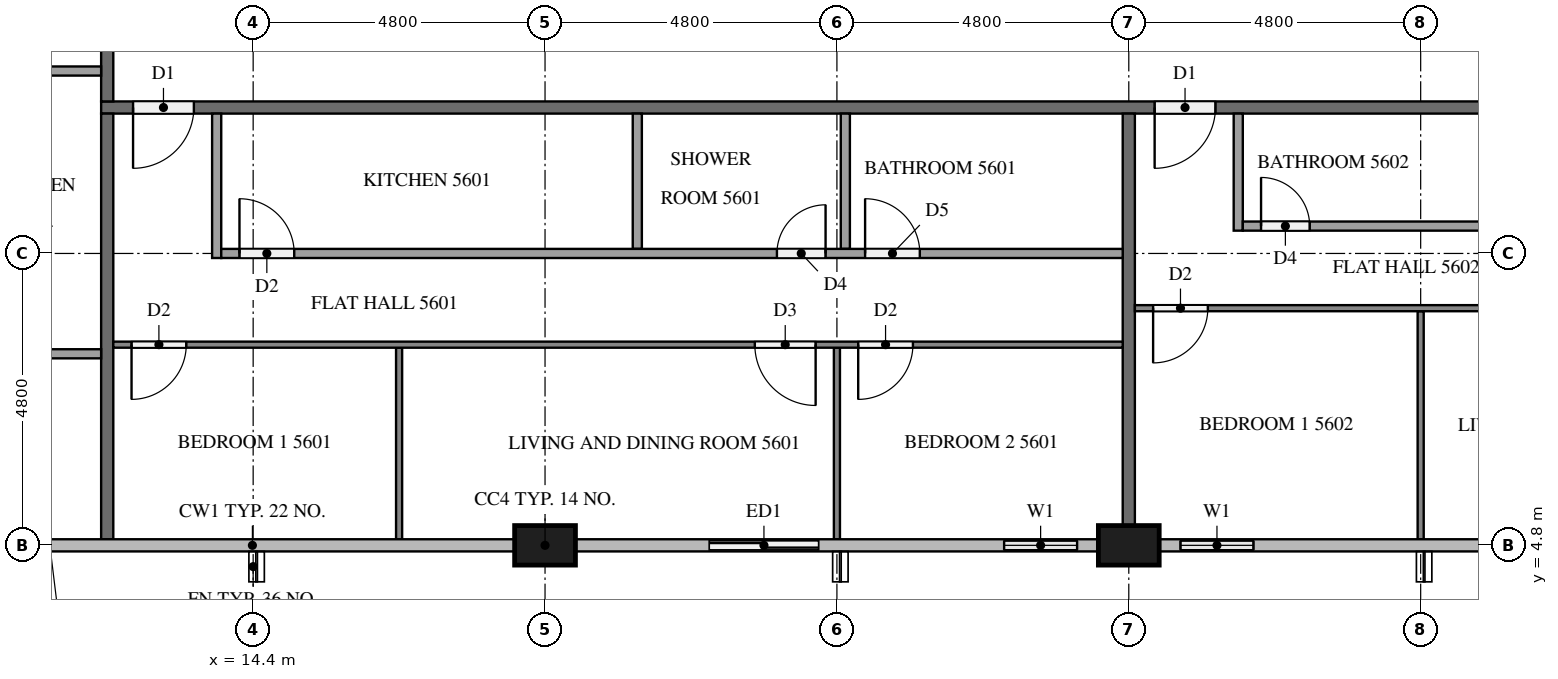
"""IFC4 building model, lengths in metres.
Left out: names, types, materials, properties, quantities, classifications, styles, units other than length and angle.
Written with IfcOpenShell. Run it as: python <this file> out.ifc"""

import sys

from ifc_helpers import new_model, si_unit, direction, frame, frame_2d, origin, origin_2d, place, context, subcontext, project, spatial, rectangle, extrude, element, fill, save


model = new_model("IFC4")
c1 = context("Model", 3, precision=1e-05, world=origin(), true_north=direction((0.0, 1.0)))
c2 = subcontext(c1, "Body", "Model", "MODEL_VIEW")
j1 = project(units=[si_unit("LENGTHUNIT", "METRE"), si_unit("PLANEANGLEUNIT", "RADIAN")], contexts=[c1])
p1 = place(None, origin())
s1 = spatial("IfcSite", under=j1, at=p1, CompositionType="ELEMENT")
p2 = place(p1, origin())
s2 = spatial("IfcBuilding", under=s1, at=p2, CompositionType="ELEMENT")
p3 = place(p2, frame((0.0, 0.0, 215.8)))
s3 = spatial("IfcBuildingStorey", under=s2, at=p3, CompositionType="ELEMENT", Elevation=215.8)
for number, where, z_axis, x_axis in (
    (1, (19.2, 4.8, 0.0), (0.0, 0.0, 1.0), (1.0, 0.0, 0.0)),
    (2, (28.8, 4.8, 0.0), (0.0, 0.0, 1.0), (1.0, 0.0, 0.0)),
):
    element("IfcColumn", number, at=place(p3, frame(where, z_axis=z_axis, x_axis=x_axis)), inside=s3, PredefinedType="COLUMN", context=c2, shape_type="SweptSolid", body=[
        extrude(rectangle(XDim=1.0, YDim=0.65, at=origin_2d()), origin(), (0.0, 0.0, 1.0), 3.2),
    ])
p4 = place(p3, frame((21.6, 4.8, 0.0), z_axis=(0.0, 0.0, 1.0), x_axis=(1.0, 0.0, 0.0)))
e3 = element("IfcWall", 3, at=p4, inside=s3, PredefinedType="SOLIDWALL", context=c2, shape_type="SweptSolid", body=[
    extrude(rectangle(XDim=2.4, YDim=0.15, at=frame_2d((1.2, 0.0))), origin(), (0.0, 0.0, 1.0), 3.2),
])
p5 = place(p4, frame((0.3, 0.0, 0.0)))
e4 = element("IfcOpeningElement", 4, at=p5, cuts=e3, PredefinedType="OPENING", context=c2, shape_type="SweptSolid", body=[
    extrude(rectangle(XDim=1.8, YDim=2.4, at=frame_2d((0.9, 1.2))), frame((0.0, 0.085, 0.0), z_axis=(0.0, -1.0, 0.0), x_axis=(1.0, 0.0, 0.0)), (0.0, 0.0, 1.0), 0.17),
])
p6 = place(p3, frame((26.4, 4.8, 0.0), z_axis=(0.0, 0.0, 1.0), x_axis=(1.0, 0.0, 0.0)))
e5 = element("IfcWall", 5, at=p6, inside=s3, PredefinedType="SOLIDWALL", context=c2, shape_type="SweptSolid", body=[
    extrude(rectangle(XDim=1.9, YDim=0.15, at=frame_2d((0.95, 0.0))), origin(), (0.0, 0.0, 1.0), 3.2),
])
p7 = place(p6, frame((0.35, 0.0, 0.9)))
e6 = element("IfcOpeningElement", 6, at=p7, cuts=e5, PredefinedType="OPENING", context=c2, shape_type="SweptSolid", body=[
    extrude(rectangle(XDim=1.2, YDim=1.4, at=frame_2d((0.6, 0.7))), frame((0.0, 0.085, 0.0), z_axis=(0.0, -1.0, 0.0), x_axis=(1.0, 0.0, 0.0)), (0.0, 0.0, 1.0), 0.17),
])
p8 = place(p3, frame((29.3, 4.8, 0.0), z_axis=(0.0, 0.0, 1.0), x_axis=(1.0, 0.0, 0.0)))
e7 = element("IfcWall", 7, at=p8, inside=s3, PredefinedType="SOLIDWALL", context=c2, shape_type="SweptSolid", body=[
    extrude(rectangle(XDim=1.9, YDim=0.15, at=frame_2d((0.95, 0.0))), origin(), (0.0, 0.0, 1.0), 3.2),
])
p9 = place(p8, frame((0.35, 0.0, 0.9)))
e8 = element("IfcOpeningElement", 8, at=p9, cuts=e7, PredefinedType="OPENING", context=c2, shape_type="SweptSolid", body=[
    extrude(rectangle(XDim=1.2, YDim=1.4, at=frame_2d((0.6, 0.7))), frame((0.0, 0.085, 0.0), z_axis=(0.0, -1.0, 0.0), x_axis=(1.0, 0.0, 0.0)), (0.0, 0.0, 1.0), 0.17),
])
p10 = place(p3, frame((50.5, 12.0, 0.0), z_axis=(0.0, 0.0, 1.0), x_axis=(-1.0, 0.0, 0.0)))
e9 = element("IfcWall", 9, at=p10, inside=s3, PredefinedType="PARTITIONING", context=c2, shape_type="SweptSolid", body=[
    extrude(rectangle(XDim=38.6, YDim=0.2, at=frame_2d((19.3, 0.0))), origin(), (0.0, 0.0, 1.0), 3.2),
])
p11 = place(p10, frame((37.075, 0.0, 0.0)))
e10 = element("IfcOpeningElement", 10, at=p11, cuts=e9, PredefinedType="OPENING", context=c2, shape_type="SweptSolid", body=[
    extrude(rectangle(XDim=1.0, YDim=2.1, at=frame_2d((0.5, 1.05))), frame((0.0, 0.11, 0.0), z_axis=(0.0, -1.0, 0.0), x_axis=(1.0, 0.0, 0.0)), (0.0, 0.0, 1.0), 0.22),
])
p12 = place(p10, frame((20.275, 0.0, 0.0)))
e11 = element("IfcOpeningElement", 11, at=p12, cuts=e9, PredefinedType="OPENING", context=c2, shape_type="SweptSolid", body=[
    extrude(rectangle(XDim=1.0, YDim=2.1, at=frame_2d((0.5, 1.05))), frame((0.0, 0.11, 0.0), z_axis=(0.0, -1.0, 0.0), x_axis=(1.0, 0.0, 0.0)), (0.0, 0.0, 1.0), 0.22),
])
p13 = place(p10, frame((0.525, 0.0, 0.0)))
e12 = element("IfcOpeningElement", 12, at=p13, cuts=e9, PredefinedType="OPENING", context=c2, shape_type="SweptSolid", body=[
    extrude(rectangle(XDim=1.0, YDim=2.1, at=frame_2d((0.5, 1.05))), frame((0.0, 0.11, 0.0), z_axis=(0.0, -1.0, 0.0), x_axis=(1.0, 0.0, 0.0)), (0.0, 0.0, 1.0), 0.22),
])
p14 = place(p3, frame((12.0, 12.1, 0.0), z_axis=(0.0, 0.0, 1.0), x_axis=(0.0, 1.0, 0.0)))
e13 = element("IfcWall", 13, at=p14, inside=s3, PredefinedType="PARTITIONING", context=c2, shape_type="SweptSolid", body=[
    extrude(rectangle(XDim=28.6, YDim=0.2, at=frame_2d((14.3, 0.0))), origin(), (0.0, 0.0, 1.0), 3.2),
])
p15 = place(p14, frame((27.275, 0.0, 0.0)))
e14 = element("IfcOpeningElement", 14, at=p15, cuts=e13, PredefinedType="OPENING", context=c2, shape_type="SweptSolid", body=[
    extrude(rectangle(XDim=1.0, YDim=2.1, at=frame_2d((0.5, 1.05))), frame((0.0, 0.11, 0.0), z_axis=(0.0, -1.0, 0.0), x_axis=(1.0, 0.0, 0.0)), (0.0, 0.0, 1.0), 0.22),
])
p16 = place(p14, frame((12.325, 0.0, 0.0)))
e15 = element("IfcOpeningElement", 15, at=p16, cuts=e13, PredefinedType="OPENING", context=c2, shape_type="SweptSolid", body=[
    extrude(rectangle(XDim=1.0, YDim=2.1, at=frame_2d((0.5, 1.05))), frame((0.0, 0.11, 0.0), z_axis=(0.0, -1.0, 0.0), x_axis=(1.0, 0.0, 0.0)), (0.0, 0.0, 1.0), 0.22),
])
p17 = place(p14, frame((2.725, 0.0, 0.0)))
e16 = element("IfcOpeningElement", 16, at=p17, cuts=e13, PredefinedType="OPENING", context=c2, shape_type="SweptSolid", body=[
    extrude(rectangle(XDim=1.0, YDim=2.1, at=frame_2d((0.5, 1.05))), frame((0.0, 0.11, 0.0), z_axis=(0.0, -1.0, 0.0), x_axis=(1.0, 0.0, 0.0)), (0.0, 0.0, 1.0), 0.22),
])
p18 = place(p14, frame((0.875, 0.0, 0.0)))
e17 = element("IfcOpeningElement", 17, at=p18, cuts=e13, PredefinedType="OPENING", context=c2, shape_type="SweptSolid", body=[
    extrude(rectangle(XDim=1.0, YDim=2.1, at=frame_2d((0.5, 1.05))), frame((0.0, 0.11, 0.0), z_axis=(0.0, -1.0, 0.0), x_axis=(1.0, 0.0, 0.0)), (0.0, 0.0, 1.0), 0.22),
])
p19 = place(p3, frame((28.8, 11.9, 0.0), z_axis=(0.0, 0.0, 1.0), x_axis=(0.0, -1.0, 0.0)))
e18 = element("IfcWall", 18, at=p19, inside=s3, PredefinedType="PARTITIONING", context=c2, shape_type="SweptSolid", body=[
    extrude(rectangle(XDim=6.775, YDim=0.2, at=frame_2d((3.387, 0.0))), origin(), (0.0, 0.0, 1.0), 3.2),
])
p20 = place(p3, frame((12.0, 4.9, 0.0), z_axis=(0.0, 0.0, 1.0), x_axis=(0.0, 1.0, 0.0)))
e19 = element("IfcWall", 19, at=p20, inside=s3, PredefinedType="PARTITIONING", context=c2, shape_type="SweptSolid", body=[
    extrude(rectangle(XDim=7.0, YDim=0.2, at=frame_2d((3.5, 0.0))), origin(), (0.0, 0.0, 1.0), 3.2),
])
for number, where, z_axis, x_axis in (
    (20, (16.8, 8.05, 0.0), (0.0, 0.0, 1.0), (0.0, -1.0, 0.0)),
    (21, (24.0, 8.05, 0.0), (0.0, 0.0, 1.0), (0.0, -1.0, 0.0)),
):
    element("IfcWall", number, at=place(p3, frame(where, z_axis=z_axis, x_axis=x_axis)), inside=s3, PredefinedType="PARTITIONING", context=c2, shape_type="SweptSolid", body=[
        extrude(rectangle(XDim=3.15, YDim=0.1, at=frame_2d((1.575, 0.0))), origin(), (0.0, 0.0, 1.0), 3.2),
    ])
p21 = place(p3, frame((28.7, 8.1, 0.0), z_axis=(0.0, 0.0, 1.0), x_axis=(-1.0, 0.0, 0.0)))
e22 = element("IfcWall", 22, at=p21, inside=s3, PredefinedType="PARTITIONING", context=c2, shape_type="SweptSolid", body=[
    extrude(rectangle(XDim=16.6, YDim=0.1, at=frame_2d((8.3, 0.0))), origin(), (0.0, 0.0, 1.0), 3.2),
])
p22 = place(p21, frame((15.4, 0.0, 0.0)))
e23 = element("IfcOpeningElement", 23, at=p22, cuts=e22, PredefinedType="OPENING", context=c2, shape_type="SweptSolid", body=[
    extrude(rectangle(XDim=0.9, YDim=2.1, at=frame_2d((0.45, 1.05))), frame((0.0, 0.06, 0.0), z_axis=(0.0, -1.0, 0.0), x_axis=(1.0, 0.0, 0.0)), (0.0, 0.0, 1.0), 0.12),
])
p23 = place(p21, frame((5.05, 0.0, 0.0)))
e24 = element("IfcOpeningElement", 24, at=p23, cuts=e22, PredefinedType="OPENING", context=c2, shape_type="SweptSolid", body=[
    extrude(rectangle(XDim=1.0, YDim=2.1, at=frame_2d((0.5, 1.05))), frame((0.0, 0.06, 0.0), z_axis=(0.0, -1.0, 0.0), x_axis=(1.0, 0.0, 0.0)), (0.0, 0.0, 1.0), 0.12),
])
p24 = place(p21, frame((3.45, 0.0, 0.0)))
e25 = element("IfcOpeningElement", 25, at=p24, cuts=e22, PredefinedType="OPENING", context=c2, shape_type="SweptSolid", body=[
    extrude(rectangle(XDim=0.9, YDim=2.1, at=frame_2d((0.45, 1.05))), frame((0.0, 0.06, 0.0), z_axis=(0.0, -1.0, 0.0), x_axis=(1.0, 0.0, 0.0)), (0.0, 0.0, 1.0), 0.12),
])
for number, where, z_axis, x_axis in (
    (26, (20.717, 11.9, 0.0), (0.0, 0.0, 1.0), (0.0, -1.0, 0.0)),
    (27, (24.138, 11.9, 0.0), (0.0, 0.0, 1.0), (0.0, -1.0, 0.0)),
):
    element("IfcWall", number, at=place(p3, frame(where, z_axis=z_axis, x_axis=x_axis)), inside=s3, PredefinedType="PARTITIONING", context=c2, shape_type="SweptSolid", body=[
        extrude(rectangle(XDim=2.225, YDim=0.15, at=frame_2d((1.112, 0.0))), origin(), (0.0, 0.0, 1.0), 3.2),
    ])
p25 = place(p3, frame((13.8, 11.9, 0.0), z_axis=(0.0, 0.0, 1.0), x_axis=(0.0, -1.0, 0.0)))
e28 = element("IfcWall", 28, at=p25, inside=s3, PredefinedType="PARTITIONING", context=c2, shape_type="SweptSolid", body=[
    extrude(rectangle(XDim=2.375, YDim=0.15, at=frame_2d((1.188, 0.0))), origin(), (0.0, 0.0, 1.0), 3.2),
])
p26 = place(p3, frame((13.875, 9.6, 0.0), z_axis=(0.0, 0.0, 1.0), x_axis=(1.0, 0.0, 0.0)))
e29 = element("IfcWall", 29, at=p26, inside=s3, PredefinedType="PARTITIONING", context=c2, shape_type="SweptSolid", body=[
    extrude(rectangle(XDim=14.825, YDim=0.15, at=frame_2d((7.413, 0.0))), origin(), (0.0, 0.0, 1.0), 3.2),
])
p27 = place(p26, frame((0.3, 0.0, 0.0)))
e30 = element("IfcOpeningElement", 30, at=p27, cuts=e29, PredefinedType="OPENING", context=c2, shape_type="SweptSolid", body=[
    extrude(rectangle(XDim=0.9, YDim=2.1, at=frame_2d((0.45, 1.05))), frame((0.0, 0.085, 0.0), z_axis=(0.0, -1.0, 0.0), x_axis=(1.0, 0.0, 0.0)), (0.0, 0.0, 1.0), 0.17),
])
p28 = place(p26, frame((9.138, 0.0, 0.0)))
e31 = element("IfcOpeningElement", 31, at=p28, cuts=e29, PredefinedType="OPENING", context=c2, shape_type="SweptSolid", body=[
    extrude(rectangle(XDim=0.8, YDim=2.1, at=frame_2d((0.4, 1.05))), frame((0.0, 0.085, 0.0), z_axis=(0.0, -1.0, 0.0), x_axis=(1.0, 0.0, 0.0)), (0.0, 0.0, 1.0), 0.17),
])
p29 = place(p26, frame((10.588, 0.0, 0.0)))
e32 = element("IfcOpeningElement", 32, at=p29, cuts=e29, PredefinedType="OPENING", context=c2, shape_type="SweptSolid", body=[
    extrude(rectangle(XDim=0.9, YDim=2.1, at=frame_2d((0.45, 1.05))), frame((0.0, 0.085, 0.0), z_axis=(0.0, -1.0, 0.0), x_axis=(1.0, 0.0, 0.0)), (0.0, 0.0, 1.0), 0.17),
])
p30 = place(p3, frame((33.6, 8.65, 0.0), z_axis=(0.0, 0.0, 1.0), x_axis=(0.0, -1.0, 0.0)))
e33 = element("IfcWall", 33, at=p30, inside=s3, PredefinedType="PARTITIONING", context=c2, shape_type="SweptSolid", body=[
    extrude(rectangle(XDim=3.75, YDim=0.1, at=frame_2d((1.875, 0.0))), origin(), (0.0, 0.0, 1.0), 3.2),
])
p31 = place(p3, frame((40.7, 8.7, 0.0), z_axis=(0.0, 0.0, 1.0), x_axis=(-1.0, 0.0, 0.0)))
e34 = element("IfcWall", 34, at=p31, inside=s3, PredefinedType="PARTITIONING", context=c2, shape_type="SweptSolid", body=[
    extrude(rectangle(XDim=11.8, YDim=0.1, at=frame_2d((5.9, 0.0))), origin(), (0.0, 0.0, 1.0), 3.2),
])
p32 = place(p31, frame((10.6, 0.0, 0.0)))
e35 = element("IfcOpeningElement", 35, at=p32, cuts=e34, PredefinedType="OPENING", context=c2, shape_type="SweptSolid", body=[
    extrude(rectangle(XDim=0.9, YDim=2.1, at=frame_2d((0.45, 1.05))), frame((0.0, 0.06, 0.0), z_axis=(0.0, -1.0, 0.0), x_axis=(1.0, 0.0, 0.0)), (0.0, 0.0, 1.0), 0.12),
])
p33 = place(p31, frame((0.3, 0.0, 0.0)))
e36 = element("IfcOpeningElement", 36, at=p33, cuts=e34, PredefinedType="OPENING", context=c2, shape_type="SweptSolid", body=[
    extrude(rectangle(XDim=1.0, YDim=2.1, at=frame_2d((0.5, 1.05))), frame((0.0, 0.06, 0.0), z_axis=(0.0, -1.0, 0.0), x_axis=(1.0, 0.0, 0.0)), (0.0, 0.0, 1.0), 0.12),
])
p34 = place(p3, frame((30.6, 11.9, 0.0), z_axis=(0.0, 0.0, 1.0), x_axis=(0.0, -1.0, 0.0)))
e37 = element("IfcWall", 37, at=p34, inside=s3, PredefinedType="PARTITIONING", context=c2, shape_type="SweptSolid", body=[
    extrude(rectangle(XDim=1.925, YDim=0.15, at=frame_2d((0.962, 0.0))), origin(), (0.0, 0.0, 1.0), 3.2),
])
p35 = place(p3, frame((30.675, 10.05, 0.0), z_axis=(0.0, 0.0, 1.0), x_axis=(1.0, 0.0, 0.0)))
e38 = element("IfcWall", 38, at=p35, inside=s3, PredefinedType="PARTITIONING", context=c2, shape_type="SweptSolid", body=[
    extrude(rectangle(XDim=10.025, YDim=0.15, at=frame_2d((5.012, 0.0))), origin(), (0.0, 0.0, 1.0), 3.2),
])
p36 = place(p35, frame((0.3, 0.0, 0.0)))
e39 = element("IfcOpeningElement", 39, at=p36, cuts=e38, PredefinedType="OPENING", context=c2, shape_type="SweptSolid", body=[
    extrude(rectangle(XDim=0.8, YDim=2.1, at=frame_2d((0.4, 1.05))), frame((0.0, 0.085, 0.0), z_axis=(0.0, -1.0, 0.0), x_axis=(1.0, 0.0, 0.0)), (0.0, 0.0, 1.0), 0.17),
])
p37 = place(p35, frame((8.775, 0.0, 0.0)))
e40 = element("IfcOpeningElement", 40, at=p37, cuts=e38, PredefinedType="OPENING", context=c2, shape_type="SweptSolid", body=[
    extrude(rectangle(XDim=0.9, YDim=2.1, at=frame_2d((0.45, 1.05))), frame((0.0, 0.085, 0.0), z_axis=(0.0, -1.0, 0.0), x_axis=(1.0, 0.0, 0.0)), (0.0, 0.0, 1.0), 0.17),
])
p38 = place(p3, frame((11.9, 7.95, 0.0), z_axis=(0.0, 0.0, 1.0), x_axis=(-1.0, 0.0, 0.0)))
e41 = element("IfcWall", 41, at=p38, inside=s3, PredefinedType="PARTITIONING", context=c2, shape_type="SweptSolid", body=[
    extrude(rectangle(XDim=2.075, YDim=0.15, at=frame_2d((1.038, 0.0))), origin(), (0.0, 0.0, 1.0), 3.2),
])
p39 = place(p3, frame((11.9, 12.6, 0.0), z_axis=(0.0, 0.0, 1.0), x_axis=(-1.0, 0.0, 0.0)))
e42 = element("IfcWall", 42, at=p39, inside=s3, PredefinedType="PARTITIONING", context=c2, shape_type="SweptSolid", body=[
    extrude(rectangle(XDim=2.225, YDim=0.15, at=frame_2d((1.112, 0.0))), origin(), (0.0, 0.0, 1.0), 3.2),
])
p40 = place(p5, origin())
e43 = element("IfcDoor", 43, at=p40, inside=s3, OperationType="SLIDING_TO_LEFT", PredefinedType="DOOR", context=c2, shape_type="SweptSolid", body=[
    extrude(rectangle(XDim=1.8, YDim=2.4, at=frame_2d((0.9, 1.2))), frame((0.0, 0.025, 0.0), z_axis=(0.0, -1.0, 0.0), x_axis=(1.0, 0.0, 0.0)), (0.0, 0.0, 1.0), 0.05),
])
fill(e4, e43)
p41 = place(p7, origin())
e44 = element("IfcWindow", 44, at=p41, inside=s3, PartitioningType="SINGLE_PANEL", PredefinedType="WINDOW", context=c2, shape_type="SweptSolid", body=[
    extrude(rectangle(XDim=1.2, YDim=1.4, at=frame_2d((0.6, 0.7))), frame((0.0, 0.03, 0.0), z_axis=(0.0, -1.0, 0.0), x_axis=(1.0, 0.0, 0.0)), (0.0, 0.0, 1.0), 0.06),
])
fill(e6, e44)
p42 = place(p9, origin())
e45 = element("IfcWindow", 45, at=p42, inside=s3, PartitioningType="SINGLE_PANEL", PredefinedType="WINDOW", context=c2, shape_type="SweptSolid", body=[
    extrude(rectangle(XDim=1.2, YDim=1.4, at=frame_2d((0.6, 0.7))), frame((0.0, 0.03, 0.0), z_axis=(0.0, -1.0, 0.0), x_axis=(1.0, 0.0, 0.0)), (0.0, 0.0, 1.0), 0.06),
])
fill(e8, e45)
p43 = place(p11, origin())
e46 = element("IfcDoor", 46, at=p43, inside=s3, OperationType="SINGLE_SWING_RIGHT", PredefinedType="DOOR", context=c2, shape_type="SweptSolid", body=[
    extrude(rectangle(XDim=1.0, YDim=2.1, at=frame_2d((0.5, 1.05))), frame((0.0, 0.025, 0.0), z_axis=(0.0, -1.0, 0.0), x_axis=(1.0, 0.0, 0.0)), (0.0, 0.0, 1.0), 0.05),
])
fill(e10, e46)
p44 = place(p12, origin())
e47 = element("IfcDoor", 47, at=p44, inside=s3, OperationType="SINGLE_SWING_RIGHT", PredefinedType="DOOR", context=c2, shape_type="SweptSolid", body=[
    extrude(rectangle(XDim=1.0, YDim=2.1, at=frame_2d((0.5, 1.05))), frame((0.0, 0.025, 0.0), z_axis=(0.0, -1.0, 0.0), x_axis=(1.0, 0.0, 0.0)), (0.0, 0.0, 1.0), 0.05),
])
fill(e11, e47)
p45 = place(p22, origin())
e48 = element("IfcDoor", 48, at=p45, inside=s3, OperationType="SINGLE_SWING_RIGHT", PredefinedType="DOOR", context=c2, shape_type="SweptSolid", body=[
    extrude(rectangle(XDim=0.9, YDim=2.1, at=frame_2d((0.45, 1.05))), frame((0.0, 0.025, 0.0), z_axis=(0.0, -1.0, 0.0), x_axis=(1.0, 0.0, 0.0)), (0.0, 0.0, 1.0), 0.05),
])
fill(e23, e48)
p46 = place(p23, origin())
e49 = element("IfcDoor", 49, at=p46, inside=s3, OperationType="SINGLE_SWING_LEFT", PredefinedType="DOOR", context=c2, shape_type="SweptSolid", body=[
    extrude(rectangle(XDim=1.0, YDim=2.1, at=frame_2d((0.5, 1.05))), frame((0.0, 0.025, 0.0), z_axis=(0.0, -1.0, 0.0), x_axis=(1.0, 0.0, 0.0)), (0.0, 0.0, 1.0), 0.05),
])
fill(e24, e49)
p47 = place(p24, origin())
e50 = element("IfcDoor", 50, at=p47, inside=s3, OperationType="SINGLE_SWING_RIGHT", PredefinedType="DOOR", context=c2, shape_type="SweptSolid", body=[
    extrude(rectangle(XDim=0.9, YDim=2.1, at=frame_2d((0.45, 1.05))), frame((0.0, 0.025, 0.0), z_axis=(0.0, -1.0, 0.0), x_axis=(1.0, 0.0, 0.0)), (0.0, 0.0, 1.0), 0.05),
])
fill(e25, e50)
p48 = place(p27, origin())
e51 = element("IfcDoor", 51, at=p48, inside=s3, OperationType="SINGLE_SWING_LEFT", PredefinedType="DOOR", context=c2, shape_type="SweptSolid", body=[
    extrude(rectangle(XDim=0.9, YDim=2.1, at=frame_2d((0.45, 1.05))), frame((0.0, 0.025, 0.0), z_axis=(0.0, -1.0, 0.0), x_axis=(1.0, 0.0, 0.0)), (0.0, 0.0, 1.0), 0.05),
])
fill(e30, e51)
p49 = place(p28, origin())
e52 = element("IfcDoor", 52, at=p49, inside=s3, OperationType="SINGLE_SWING_RIGHT", PredefinedType="DOOR", context=c2, shape_type="SweptSolid", body=[
    extrude(rectangle(XDim=0.8, YDim=2.1, at=frame_2d((0.4, 1.05))), frame((0.0, 0.025, 0.0), z_axis=(0.0, -1.0, 0.0), x_axis=(1.0, 0.0, 0.0)), (0.0, 0.0, 1.0), 0.05),
])
fill(e31, e52)
p50 = place(p29, origin())
e53 = element("IfcDoor", 53, at=p50, inside=s3, OperationType="SINGLE_SWING_LEFT", PredefinedType="DOOR", context=c2, shape_type="SweptSolid", body=[
    extrude(rectangle(XDim=0.9, YDim=2.1, at=frame_2d((0.45, 1.05))), frame((0.0, 0.025, 0.0), z_axis=(0.0, -1.0, 0.0), x_axis=(1.0, 0.0, 0.0)), (0.0, 0.0, 1.0), 0.05),
])
fill(e32, e53)
p51 = place(p32, origin())
e54 = element("IfcDoor", 54, at=p51, inside=s3, OperationType="SINGLE_SWING_RIGHT", PredefinedType="DOOR", context=c2, shape_type="SweptSolid", body=[
    extrude(rectangle(XDim=0.9, YDim=2.1, at=frame_2d((0.45, 1.05))), frame((0.0, 0.025, 0.0), z_axis=(0.0, -1.0, 0.0), x_axis=(1.0, 0.0, 0.0)), (0.0, 0.0, 1.0), 0.05),
])
fill(e35, e54)
p52 = place(p36, origin())
e55 = element("IfcDoor", 55, at=p52, inside=s3, OperationType="SINGLE_SWING_LEFT", PredefinedType="DOOR", context=c2, shape_type="SweptSolid", body=[
    extrude(rectangle(XDim=0.8, YDim=2.1, at=frame_2d((0.4, 1.05))), frame((0.0, 0.025, 0.0), z_axis=(0.0, -1.0, 0.0), x_axis=(1.0, 0.0, 0.0)), (0.0, 0.0, 1.0), 0.05),
])
fill(e39, e55)
save(model, sys.argv[1])
